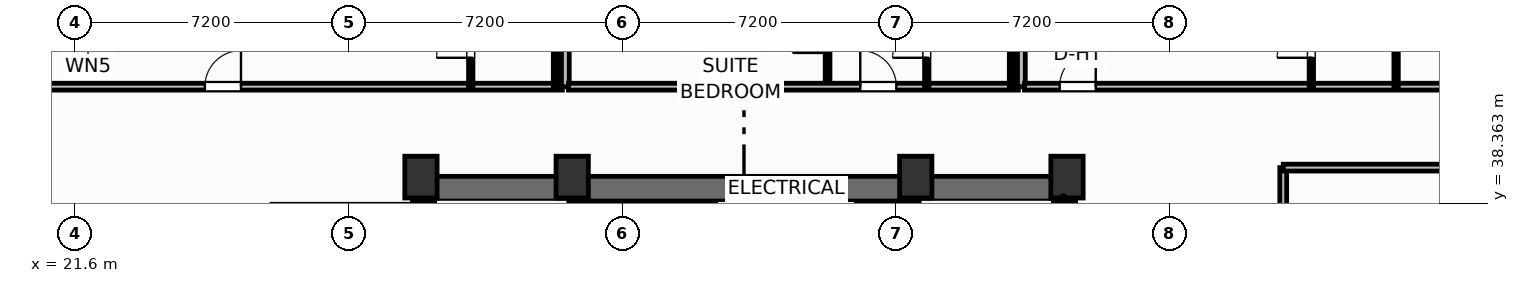
"""IFC4 building model, lengths in metres.
Left out: names, types, materials, properties, quantities, classifications, styles, units other than length and angle.
Written with IfcOpenShell. Run it as: python <this file> out.ifc"""

import sys

from ifc_helpers import new_model, si_unit, direction, frame, frame_2d, origin, origin_2d, place, context, subcontext, project, spatial, rectangle, extrude, element, fill, save


model = new_model("IFC4")
c1 = context("Model", 3, precision=1e-05, world=origin(), true_north=direction((0.0, 1.0)))
c2 = subcontext(c1, "Body", "Model", "MODEL_VIEW")
j1 = project(units=[si_unit("LENGTHUNIT", "METRE"), si_unit("PLANEANGLEUNIT", "RADIAN")], contexts=[c1])
p1 = place(None, origin())
s1 = spatial("IfcSite", under=j1, at=p1, CompositionType="ELEMENT")
p2 = place(p1, origin())
s2 = spatial("IfcBuilding", under=s1, at=p2, CompositionType="ELEMENT")
p3 = place(p2, frame((0.0, 0.0, 170.9)))
s3 = spatial("IfcBuildingStorey", under=s2, at=p3, CompositionType="ELEMENT", Elevation=170.9)
for number, where, z_axis, x_axis in (
    (1, (30.7, 39.05, 0.0), (0.0, 0.0, 1.0), (1.0, 0.0, 0.0)),
    (2, (34.68, 39.05, 0.0), (0.0, 0.0, 1.0), (1.0, 0.0, 0.0)),
    (3, (43.72, 39.05, 0.0), (0.0, 0.0, 1.0), (1.0, 0.0, 0.0)),
    (4, (47.7, 39.05, 0.0), (0.0, 0.0, 1.0), (1.0, 0.0, 0.0)),
):
    element("IfcColumn", number, at=place(p3, frame(where, z_axis=z_axis, x_axis=x_axis)), inside=s3, PredefinedType="COLUMN", context=c2, shape_type="SweptSolid", body=[
        extrude(rectangle(XDim=0.85, YDim=1.1, at=origin_2d()), origin(), (0.0, 0.0, 1.0), 3.7),
    ])
p4 = place(p3, frame((30.48, 38.745, 0.0), z_axis=(0.0, 0.0, 1.0), x_axis=(1.0, 0.0, 0.0)))
e5 = element("IfcWall", 5, at=p4, inside=s3, PredefinedType="SHEAR", context=c2, shape_type="SweptSolid", body=[
    extrude(rectangle(XDim=17.44, YDim=0.65, at=frame_2d((8.72, 0.0))), origin(), (0.0, 0.0, 1.0), 3.45),
])
for number, where, z_axis, x_axis in (
    (6, (30.805, 29.2, 0.0), (0.0, 0.0, 1.0), (0.0, 1.0, 0.0)),
    (7, (47.595, 29.2, 0.0), (0.0, 0.0, 1.0), (0.0, 1.0, 0.0)),
):
    element("IfcWall", number, at=place(p3, frame(where, z_axis=z_axis, x_axis=x_axis)), inside=s3, PredefinedType="SHEAR", context=c2, shape_type="SweptSolid", body=[
        extrude(rectangle(XDim=9.22, YDim=0.65, at=frame_2d((4.61, 0.0))), origin(), (0.0, 0.0, 1.0), 3.45),
    ])
p5 = place(p3, frame((34.64, 29.2, 0.0), z_axis=(0.0, 0.0, 1.0), x_axis=(0.0, 1.0, 0.0)))
e8 = element("IfcWall", 8, at=p5, inside=s3, PredefinedType="SHEAR", context=c2, shape_type="SweptSolid", body=[
    extrude(rectangle(XDim=9.22, YDim=0.25, at=frame_2d((4.61, 0.0))), origin(), (0.0, 0.0, 1.0), 3.45),
])
p6 = place(p5, frame((0.65, 0.0, 0.0)))
e9 = element("IfcOpeningElement", 9, at=p6, cuts=e8, PredefinedType="OPENING", context=c2, shape_type="SweptSolid", body=[
    extrude(rectangle(XDim=1.05, YDim=2.15, at=frame_2d((0.525, 1.075))), frame((0.0, 0.135, 0.0), z_axis=(0.0, -1.0, 0.0), x_axis=(1.0, 0.0, 0.0)), (0.0, 0.0, 1.0), 0.27),
])
p7 = place(p3, frame((43.76, 29.2, 0.0), z_axis=(0.0, 0.0, 1.0), x_axis=(0.0, 1.0, 0.0)))
e10 = element("IfcWall", 10, at=p7, inside=s3, PredefinedType="SHEAR", context=c2, shape_type="SweptSolid", body=[
    extrude(rectangle(XDim=9.22, YDim=0.25, at=frame_2d((4.61, 0.0))), origin(), (0.0, 0.0, 1.0), 3.45),
])
p8 = place(p7, frame((0.65, 0.0, 0.0)))
e11 = element("IfcOpeningElement", 11, at=p8, cuts=e10, PredefinedType="OPENING", context=c2, shape_type="SweptSolid", body=[
    extrude(rectangle(XDim=1.05, YDim=2.15, at=frame_2d((0.525, 1.075))), frame((0.0, 0.135, 0.0), z_axis=(0.0, -1.0, 0.0), x_axis=(1.0, 0.0, 0.0)), (0.0, 0.0, 1.0), 0.27),
])
p9 = place(p3, frame((3.393, 41.43, 0.0), z_axis=(0.0, 0.0, 1.0), x_axis=(1.0, 0.0, 0.0)))
e12 = element("IfcWall", 12, at=p9, inside=s3, PredefinedType="PARTITIONING", context=c2, shape_type="SweptSolid", body=[
    extrude(rectangle(XDim=31.027, YDim=0.18, at=frame_2d((15.513, 0.0))), origin(), (0.0, 0.0, 1.0), 2.662),
])
p10 = place(p9, frame((21.621, 0.0, 0.0)))
e13 = element("IfcOpeningElement", 13, at=p10, cuts=e12, PredefinedType="OPENING", context=c2, shape_type="SweptSolid", body=[
    extrude(rectangle(XDim=0.95, YDim=2.15, at=frame_2d((0.475, 1.075))), frame((0.0, 0.1, 0.0), z_axis=(0.0, -1.0, 0.0), x_axis=(1.0, 0.0, 0.0)), (0.0, 0.0, 1.0), 0.2),
])
p11 = place(p3, frame((32.01, 41.43, 0.0), z_axis=(0.0, 0.0, 1.0), x_axis=(0.0, 1.0, 0.0)))
e14 = element("IfcWall", 14, at=p11, inside=s3, PredefinedType="PARTITIONING", context=c2, shape_type="SweptSolid", body=[
    extrude(rectangle(XDim=2.52, YDim=0.115, at=frame_2d((1.26, 0.0))), origin(), (0.0, 0.0, 1.0), 3.45),
])
p12 = place(p11, frame((0.76, 0.0, 0.0)))
e15 = element("IfcOpeningElement", 15, at=p12, cuts=e14, PredefinedType="OPENING", context=c2, shape_type="SweptSolid", body=[
    extrude(rectangle(XDim=0.9, YDim=2.05, at=frame_2d((0.45, 1.025))), frame((0.0, 0.067, 0.0), z_axis=(0.0, -1.0, 0.0), x_axis=(1.0, 0.0, 0.0)), (0.0, 0.0, 1.0), 0.135),
])
p13 = place(p3, frame((34.24, 41.43, 0.0), z_axis=(0.0, 0.0, 1.0), x_axis=(0.0, 1.0, 0.0)))
e16 = element("IfcWall", 16, at=p13, inside=s3, PredefinedType="PARTITIONING", context=c2, shape_type="SweptSolid", body=[
    extrude(rectangle(XDim=2.52, YDim=0.115, at=frame_2d((1.26, 0.0))), origin(), (0.0, 0.0, 1.0), 3.45),
])
p14 = place(p3, frame((34.5, 41.43, 0.0), z_axis=(0.0, 0.0, 1.0), x_axis=(0.0, 1.0, 0.0)))
e17 = element("IfcWall", 17, at=p14, inside=s3, PredefinedType="PARTITIONING", context=c2, shape_type="SweptSolid", body=[
    extrude(rectangle(XDim=3.104, YDim=0.205, at=frame_2d((1.552, 0.0))), origin(), (0.0, 0.0, 1.0), 3.45),
])
p15 = place(p3, frame((41.4, 41.43, 0.0), z_axis=(0.0, 0.0, 1.0), x_axis=(0.0, 1.0, 0.0)))
e18 = element("IfcWall", 18, at=p15, inside=s3, PredefinedType="PARTITIONING", context=c2, shape_type="SweptSolid", body=[
    extrude(rectangle(XDim=6.056, YDim=0.125, at=frame_2d((3.028, 0.0))), origin(), (0.0, 0.0, 1.0), 3.45),
])
p16 = place(p15, frame((0.888, 0.0, 0.0)))
e19 = element("IfcOpeningElement", 19, at=p16, cuts=e18, PredefinedType="OPENING", context=c2, shape_type="SweptSolid", body=[
    extrude(rectangle(XDim=0.92, YDim=2.05, at=frame_2d((0.46, 1.025))), frame((0.0, 0.073, 0.0), z_axis=(0.0, -1.0, 0.0), x_axis=(1.0, 0.0, 0.0)), (0.0, 0.0, 1.0), 0.145),
])
p17 = place(p3, frame((34.58, 41.43, 0.0), z_axis=(0.0, 0.0, 1.0), x_axis=(1.0, 0.0, 0.0)))
e20 = element("IfcWall", 20, at=p17, inside=s3, PredefinedType="PARTITIONING", context=c2, shape_type="SweptSolid", body=[
    extrude(rectangle(XDim=11.84, YDim=0.18, at=frame_2d((5.92, 0.0))), origin(), (0.0, 0.0, 1.0), 3.45),
])
p18 = place(p17, frame((7.68, 0.0, 0.0)))
e21 = element("IfcOpeningElement", 21, at=p18, cuts=e20, PredefinedType="OPENING", context=c2, shape_type="SweptSolid", body=[
    extrude(rectangle(XDim=0.95, YDim=2.15, at=frame_2d((0.475, 1.075))), frame((0.0, 0.1, 0.0), z_axis=(0.0, -1.0, 0.0), x_axis=(1.0, 0.0, 0.0)), (0.0, 0.0, 1.0), 0.2),
])
p19 = place(p3, frame((44.01, 41.43, 0.0), z_axis=(0.0, 0.0, 1.0), x_axis=(0.0, 1.0, 0.0)))
e22 = element("IfcWall", 22, at=p19, inside=s3, PredefinedType="PARTITIONING", context=c2, shape_type="SweptSolid", body=[
    extrude(rectangle(XDim=2.52, YDim=0.115, at=frame_2d((1.26, 0.0))), origin(), (0.0, 0.0, 1.0), 3.45),
])
p20 = place(p19, frame((0.76, 0.0, 0.0)))
e23 = element("IfcOpeningElement", 23, at=p20, cuts=e22, PredefinedType="OPENING", context=c2, shape_type="SweptSolid", body=[
    extrude(rectangle(XDim=0.9, YDim=2.05, at=frame_2d((0.45, 1.025))), frame((0.0, 0.067, 0.0), z_axis=(0.0, -1.0, 0.0), x_axis=(1.0, 0.0, 0.0)), (0.0, 0.0, 1.0), 0.135),
])
p21 = place(p3, frame((46.24, 41.43, 0.0), z_axis=(0.0, 0.0, 1.0), x_axis=(0.0, 1.0, 0.0)))
e24 = element("IfcWall", 24, at=p21, inside=s3, PredefinedType="PARTITIONING", context=c2, shape_type="SweptSolid", body=[
    extrude(rectangle(XDim=2.52, YDim=0.115, at=frame_2d((1.26, 0.0))), origin(), (0.0, 0.0, 1.0), 3.45),
])
p22 = place(p3, frame((46.5, 41.43, 0.0), z_axis=(0.0, 0.0, 1.0), x_axis=(0.0, 1.0, 0.0)))
e25 = element("IfcWall", 25, at=p22, inside=s3, PredefinedType="PARTITIONING", context=c2, shape_type="SweptSolid", body=[
    extrude(rectangle(XDim=6.674, YDim=0.205, at=frame_2d((3.337, 0.0))), origin(), (0.0, 0.0, 1.0), 2.662),
])
p23 = place(p3, frame((46.58, 41.43, 0.0), z_axis=(0.0, 0.0, 1.0), x_axis=(1.0, 0.0, 0.0)))
e26 = element("IfcWall", 26, at=p23, inside=s3, PredefinedType="PARTITIONING", context=c2, shape_type="SweptSolid", body=[
    extrude(rectangle(XDim=26.042, YDim=0.18, at=frame_2d((13.021, 0.0))), origin(), (0.0, 0.0, 1.0), 3.45),
])
p24 = place(p23, frame((0.926, 0.0, 0.0)))
e27 = element("IfcOpeningElement", 27, at=p24, cuts=e26, PredefinedType="OPENING", context=c2, shape_type="SweptSolid", body=[
    extrude(rectangle(XDim=0.95, YDim=2.15, at=frame_2d((0.475, 1.075))), frame((0.0, 0.1, 0.0), z_axis=(0.0, -1.0, 0.0), x_axis=(1.0, 0.0, 0.0)), (0.0, 0.0, 1.0), 0.2),
])
p25 = place(p3, frame((54.13, 41.43, 0.0), z_axis=(0.0, 0.0, 1.0), x_axis=(0.0, 1.0, 0.0)))
e28 = element("IfcWall", 28, at=p25, inside=s3, PredefinedType="PARTITIONING", context=c2, shape_type="SweptSolid", body=[
    extrude(rectangle(XDim=2.52, YDim=0.115, at=frame_2d((1.26, 0.0))), origin(), (0.0, 0.0, 1.0), 3.45),
])
p26 = place(p25, frame((0.76, 0.0, 0.0)))
e29 = element("IfcOpeningElement", 29, at=p26, cuts=e28, PredefinedType="OPENING", context=c2, shape_type="SweptSolid", body=[
    extrude(rectangle(XDim=0.9, YDim=2.05, at=frame_2d((0.45, 1.025))), frame((0.0, 0.067, 0.0), z_axis=(0.0, -1.0, 0.0), x_axis=(1.0, 0.0, 0.0)), (0.0, 0.0, 1.0), 0.135),
])
p27 = place(p3, frame((56.36, 41.43, 0.0), z_axis=(0.0, 0.0, 1.0), x_axis=(0.0, 1.0, 0.0)))
e30 = element("IfcWall", 30, at=p27, inside=s3, PredefinedType="PARTITIONING", context=c2, shape_type="SweptSolid", body=[
    extrude(rectangle(XDim=2.52, YDim=0.115, at=frame_2d((1.26, 0.0))), origin(), (0.0, 0.0, 1.0), 3.45),
])
p28 = place(p3, frame((53.39, 19.24, 0.0), z_axis=(0.0, 0.0, 1.0), x_axis=(0.0, 1.0, 0.0)))
e31 = element("IfcWall", 31, at=p28, inside=s3, PredefinedType="PARTITIONING", context=c2, shape_type="SweptSolid", body=[
    extrude(rectangle(XDim=20.06, YDim=0.18, at=frame_2d((10.03, 0.0))), origin(), (0.0, 0.0, 1.0), 3.45),
])
p29 = place(p28, frame((7.7, 0.0, 0.0)))
e32 = element("IfcOpeningElement", 32, at=p29, cuts=e31, PredefinedType="OPENING", context=c2, shape_type="SweptSolid", body=[
    extrude(rectangle(XDim=0.95, YDim=2.05, at=frame_2d((0.475, 1.025))), frame((0.0, 0.1, 0.0), z_axis=(0.0, -1.0, 0.0), x_axis=(1.0, 0.0, 0.0)), (0.0, 0.0, 1.0), 0.2),
])
p30 = place(p3, frame((53.39, 39.3, 0.0), z_axis=(0.0, 0.0, 1.0), x_axis=(1.0, 0.0, 0.0)))
e33 = element("IfcWall", 33, at=p30, inside=s3, PredefinedType="PARTITIONING", context=c2, shape_type="SweptSolid", body=[
    extrude(rectangle(XDim=19.49, YDim=0.18, at=frame_2d((9.745, 0.0))), origin(), (0.0, 0.0, 1.0), 3.45),
])
p31 = place(p10, origin())
e34 = element("IfcDoor", 34, at=p31, inside=s3, OperationType="SINGLE_SWING_RIGHT", PredefinedType="DOOR", context=c2, shape_type="SweptSolid", body=[
    extrude(rectangle(XDim=0.95, YDim=2.15, at=frame_2d((0.475, 1.075))), frame((0.0, 0.025, 0.0), z_axis=(0.0, -1.0, 0.0), x_axis=(1.0, 0.0, 0.0)), (0.0, 0.0, 1.0), 0.05),
])
fill(e13, e34)
p32 = place(p12, origin())
e35 = element("IfcDoor", 35, at=p32, inside=s3, OperationType="SINGLE_SWING_LEFT", PredefinedType="DOOR", context=c2, shape_type="SweptSolid", body=[
    extrude(rectangle(XDim=0.9, YDim=2.05, at=frame_2d((0.45, 1.025))), frame((0.0, 0.025, 0.0), z_axis=(0.0, -1.0, 0.0), x_axis=(1.0, 0.0, 0.0)), (0.0, 0.0, 1.0), 0.05),
])
fill(e15, e35)
p33 = place(p16, origin())
e36 = element("IfcDoor", 36, at=p33, inside=s3, OperationType="SINGLE_SWING_LEFT", PredefinedType="DOOR", context=c2, shape_type="SweptSolid", body=[
    extrude(rectangle(XDim=0.92, YDim=2.05, at=frame_2d((0.46, 1.025))), frame((0.0, 0.025, 0.0), z_axis=(0.0, -1.0, 0.0), x_axis=(1.0, 0.0, 0.0)), (0.0, 0.0, 1.0), 0.05),
])
fill(e19, e36)
p34 = place(p18, origin())
e37 = element("IfcDoor", 37, at=p34, inside=s3, OperationType="SINGLE_SWING_LEFT", PredefinedType="DOOR", context=c2, shape_type="SweptSolid", body=[
    extrude(rectangle(XDim=0.95, YDim=2.15, at=frame_2d((0.475, 1.075))), frame((0.0, 0.025, 0.0), z_axis=(0.0, -1.0, 0.0), x_axis=(1.0, 0.0, 0.0)), (0.0, 0.0, 1.0), 0.05),
])
fill(e21, e37)
p35 = place(p20, origin())
e38 = element("IfcDoor", 38, at=p35, inside=s3, OperationType="SINGLE_SWING_LEFT", PredefinedType="DOOR", context=c2, shape_type="SweptSolid", body=[
    extrude(rectangle(XDim=0.9, YDim=2.05, at=frame_2d((0.45, 1.025))), frame((0.0, 0.025, 0.0), z_axis=(0.0, -1.0, 0.0), x_axis=(1.0, 0.0, 0.0)), (0.0, 0.0, 1.0), 0.05),
])
fill(e23, e38)
p36 = place(p24, origin())
e39 = element("IfcDoor", 39, at=p36, inside=s3, OperationType="SINGLE_SWING_RIGHT", PredefinedType="DOOR", context=c2, shape_type="SweptSolid", body=[
    extrude(rectangle(XDim=0.95, YDim=2.15, at=frame_2d((0.475, 1.075))), frame((0.0, 0.025, 0.0), z_axis=(0.0, -1.0, 0.0), x_axis=(1.0, 0.0, 0.0)), (0.0, 0.0, 1.0), 0.05),
])
fill(e27, e39)
p37 = place(p26, origin())
e40 = element("IfcDoor", 40, at=p37, inside=s3, OperationType="SINGLE_SWING_LEFT", PredefinedType="DOOR", context=c2, shape_type="SweptSolid", body=[
    extrude(rectangle(XDim=0.9, YDim=2.05, at=frame_2d((0.45, 1.025))), frame((0.0, 0.025, 0.0), z_axis=(0.0, -1.0, 0.0), x_axis=(1.0, 0.0, 0.0)), (0.0, 0.0, 1.0), 0.05),
])
fill(e29, e40)
save(model, sys.argv[1])
